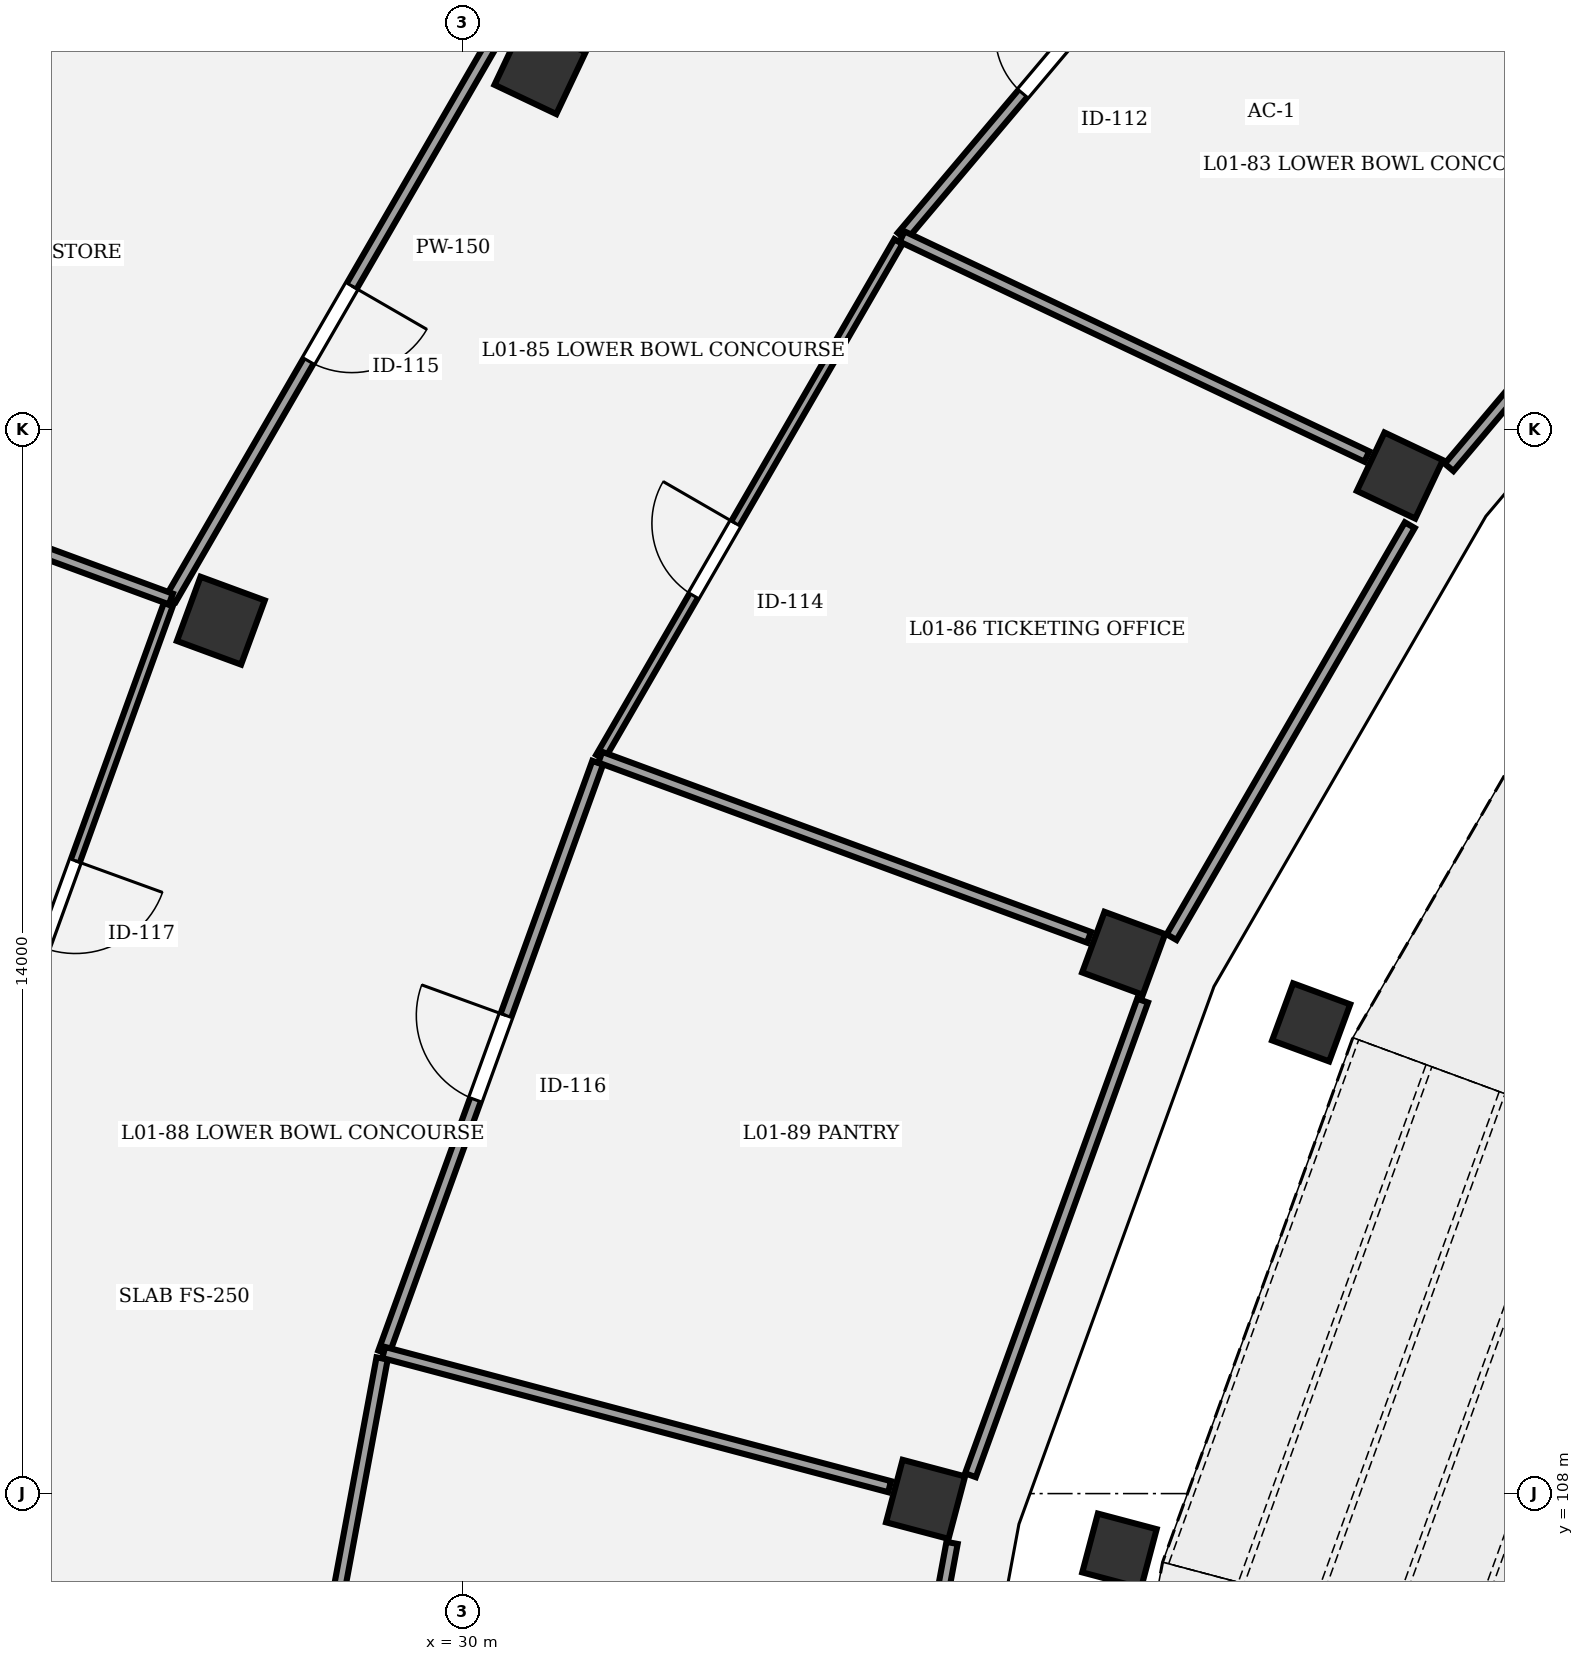
"""IFC4 building model, lengths in metres.
Left out: names, types, materials, properties, quantities, classifications, styles, units other than length and angle.
Written with IfcOpenShell. Run it as: python <this file> out.ifc"""

import sys

from ifc_helpers import new_model, si_unit, direction, frame, frame_2d, origin, origin_2d, place, context, subcontext, project, spatial, rectangle, extrude, element, fill, save


model = new_model("IFC4")
c1 = context("Model", 3, precision=1e-05, world=origin(), true_north=direction((0.0, 1.0)))
c2 = subcontext(c1, "Body", "Model", "MODEL_VIEW")
j1 = project(units=[si_unit("LENGTHUNIT", "METRE"), si_unit("PLANEANGLEUNIT", "RADIAN")], contexts=[c1])
p1 = place(None, origin())
s1 = spatial("IfcSite", under=j1, at=p1, CompositionType="ELEMENT")
p2 = place(p1, origin())
s2 = spatial("IfcBuilding", under=s1, at=p2, CompositionType="ELEMENT")
p3 = place(p2, frame((0.0, 0.0, 5.4)))
s3 = spatial("IfcBuildingStorey", under=s2, at=p3, CompositionType="ELEMENT", Elevation=5.4)
p4 = place(p3, frame((42.337, 121.394, 0.0), z_axis=(0.0, 0.0, 1.0), x_axis=(-0.903858661687, 0.4278311813, 0.0)))
e1 = element("IfcColumn", 1, at=p4, inside=s3, PredefinedType="COLUMN", context=c2, shape_type="SweptSolid", body=[
    extrude(rectangle(XDim=0.85, YDim=0.85, at=origin_2d()), origin(), (0.0, 0.0, 1.0), 4.8),
])
p5 = place(p3, frame((31.024, 126.748, 0.0), z_axis=(0.0, 0.0, 1.0), x_axis=(-0.903858661687, 0.4278311813, 0.0)))
e2 = element("IfcColumn", 2, at=p5, inside=s3, PredefinedType="COLUMN", context=c2, shape_type="SweptSolid", body=[
    extrude(rectangle(XDim=0.9, YDim=0.9, at=origin_2d()), origin(), (0.0, 0.0, 1.0), 4.8),
])
p6 = place(p3, frame((41.17, 114.199, 0.0), z_axis=(0.0, 0.0, 1.0), x_axis=(-0.938372433776, 0.34562577382, 0.0)))
e3 = element("IfcColumn", 3, at=p6, inside=s3, PredefinedType="COLUMN", context=c2, shape_type="SweptSolid", body=[
    extrude(rectangle(XDim=0.8, YDim=0.8, at=origin_2d()), origin(), (0.0, 0.0, 1.0), 4.8),
])
p7 = place(p3, frame((38.703, 115.108, 0.0), z_axis=(0.0, 0.0, 1.0), x_axis=(-0.938372433776, 0.34562577382, 0.0)))
e4 = element("IfcColumn", 4, at=p7, inside=s3, PredefinedType="COLUMN", context=c2, shape_type="SweptSolid", body=[
    extrude(rectangle(XDim=0.85, YDim=0.85, at=origin_2d()), origin(), (0.0, 0.0, 1.0), 4.8),
])
p8 = place(p3, frame((26.824, 119.484, 0.0), z_axis=(0.0, 0.0, 1.0), x_axis=(-0.938372433776, 0.34562577382, 0.0)))
e5 = element("IfcColumn", 5, at=p8, inside=s3, PredefinedType="COLUMN", context=c2, shape_type="SweptSolid", body=[
    extrude(rectangle(XDim=0.9, YDim=0.9, at=origin_2d()), origin(), (0.0, 0.0, 1.0), 4.8),
])
p9 = place(p3, frame((38.648, 107.248, 0.0), z_axis=(0.0, 0.0, 1.0), x_axis=(-0.966600102017, 0.256289373133, 0.0)))
e6 = element("IfcColumn", 6, at=p9, inside=s3, PredefinedType="COLUMN", context=c2, shape_type="SweptSolid", body=[
    extrude(rectangle(XDim=0.8, YDim=0.8, at=origin_2d()), origin(), (0.0, 0.0, 1.0), 4.8),
])
p10 = place(p3, frame((36.097, 107.924, 0.0), z_axis=(0.0, 0.0, 1.0), x_axis=(-0.966600102017, 0.256289373133, 0.0)))
e7 = element("IfcColumn", 7, at=p10, inside=s3, PredefinedType="COLUMN", context=c2, shape_type="SweptSolid", body=[
    extrude(rectangle(XDim=0.85, YDim=0.85, at=origin_2d()), origin(), (0.0, 0.0, 1.0), 4.8),
])
p11 = place(p3, frame((35.788, 124.538, 0.0), z_axis=(0.0, 0.0, 1.0), x_axis=(0.645180817826, 0.764029915847, 0.0)))
e8 = element("IfcWall", 8, at=p11, inside=s3, PredefinedType="PARTITIONING", context=c2, shape_type="SweptSolid", body=[
    extrude(rectangle(XDim=7.779, YDim=0.15, at=frame_2d((3.89, 0.0))), origin(), (0.0, 0.0, 1.0), 3.55),
])
p12 = place(p11, frame((2.462, 0.0, 0.0)))
e9 = element("IfcOpeningElement", 9, at=p12, cuts=e8, PredefinedType="OPENING", context=c2, shape_type="SweptSolid", body=[
    extrude(rectangle(XDim=1.02, YDim=2.1, at=frame_2d((0.51, 1.05))), frame((0.0, 0.085, 0.0), z_axis=(0.0, -1.0, 0.0), x_axis=(1.0, 0.0, 0.0)), (0.0, 0.0, 1.0), 0.17),
])
p13 = place(p3, frame((31.817, 117.688, 0.0), z_axis=(0.0, 0.0, 1.0), x_axis=(0.500584301803, 0.865687794063, 0.0)))
e10 = element("IfcWall", 10, at=p13, inside=s3, PredefinedType="PARTITIONING", context=c2, shape_type="SweptSolid", body=[
    extrude(rectangle(XDim=7.837, YDim=0.125, at=frame_2d((3.918, 0.0))), origin(), (0.0, 0.0, 1.0), 3.55),
])
p14 = place(p13, frame((2.454, 0.0, 0.0)))
e11 = element("IfcOpeningElement", 11, at=p14, cuts=e10, PredefinedType="OPENING", context=c2, shape_type="SweptSolid", body=[
    extrude(rectangle(XDim=1.1, YDim=2.1, at=frame_2d((0.55, 1.05))), frame((0.0, 0.073, 0.0), z_axis=(0.0, -1.0, 0.0), x_axis=(1.0, 0.0, 0.0)), (0.0, 0.0, 1.0), 0.145),
])
p15 = place(p3, frame((30.359, 127.019, 0.0), z_axis=(0.0, 0.0, 1.0), x_axis=(-0.500559280672, -0.865702262059, 0.0)))
e12 = element("IfcWall", 12, at=p15, inside=s3, PredefinedType="PARTITIONING", context=c2, shape_type="SweptSolid", body=[
    extrude(rectangle(XDim=8.375, YDim=0.15, at=frame_2d((4.187, 0.0))), origin(), (0.0, 0.0, 1.0), 3.55),
])
p16 = place(p15, frame((3.617, 0.0, 0.0)))
e13 = element("IfcOpeningElement", 13, at=p16, cuts=e12, PredefinedType="OPENING", context=c2, shape_type="SweptSolid", body=[
    extrude(rectangle(XDim=1.14, YDim=2.1, at=frame_2d((0.57, 1.05))), frame((0.0, 0.085, 0.0), z_axis=(0.0, -1.0, 0.0), x_axis=(1.0, 0.0, 0.0)), (0.0, 0.0, 1.0), 0.17),
])
p17 = place(p3, frame((28.968, 109.856, 0.0), z_axis=(0.0, 0.0, 1.0), x_axis=(0.341044733968, 0.940047067669, 0.0)))
e14 = element("IfcWall", 14, at=p17, inside=s3, PredefinedType="PARTITIONING", context=c2, shape_type="SweptSolid", body=[
    extrude(rectangle(XDim=8.254, YDim=0.15, at=frame_2d((4.127, 0.0))), origin(), (0.0, 0.0, 1.0), 3.55),
])
p18 = place(p17, frame((3.537, 0.0, 0.0)))
e15 = element("IfcOpeningElement", 15, at=p18, cuts=e14, PredefinedType="OPENING", context=c2, shape_type="SweptSolid", body=[
    extrude(rectangle(XDim=1.18, YDim=2.1, at=frame_2d((0.59, 1.05))), frame((0.0, 0.085, 0.0), z_axis=(0.0, -1.0, 0.0), x_axis=(1.0, 0.0, 0.0)), (0.0, 0.0, 1.0), 0.17),
])
p19 = place(p3, frame((26.134, 119.696, 0.0), z_axis=(0.0, 0.0, 1.0), x_axis=(-0.341044550343, -0.940047134287, 0.0)))
e16 = element("IfcWall", 16, at=p19, inside=s3, PredefinedType="PARTITIONING", context=c2, shape_type="SweptSolid", body=[
    extrude(rectangle(XDim=8.392, YDim=0.125, at=frame_2d((4.196, 0.0))), origin(), (0.0, 0.0, 1.0), 3.55),
])
p20 = place(p19, frame((3.586, 0.0, 0.0)))
e17 = element("IfcOpeningElement", 17, at=p20, cuts=e16, PredefinedType="OPENING", context=c2, shape_type="SweptSolid", body=[
    extrude(rectangle(XDim=1.22, YDim=2.1, at=frame_2d((0.61, 1.05))), frame((0.0, 0.073, 0.0), z_axis=(0.0, -1.0, 0.0), x_axis=(1.0, 0.0, 0.0)), (0.0, 0.0, 1.0), 0.145),
])
p21 = place(p3, frame((27.251, 100.651, 0.0), z_axis=(0.0, 0.0, 1.0), x_axis=(0.182600545941, 0.983187184936, 0.0)))
e18 = element("IfcWall", 18, at=p21, inside=s3, PredefinedType="PARTITIONING", context=c2, shape_type="SweptSolid", body=[
    extrude(rectangle(XDim=9.284, YDim=0.15, at=frame_2d((4.642, 0.0))), origin(), (0.0, 0.0, 1.0), 3.55),
])
p22 = place(p21, frame((4.012, 0.0, 0.0)))
e19 = element("IfcOpeningElement", 19, at=p22, cuts=e18, PredefinedType="OPENING", context=c2, shape_type="SweptSolid", body=[
    extrude(rectangle(XDim=1.26, YDim=2.1, at=frame_2d((0.63, 1.05))), frame((0.0, 0.085, 0.0), z_axis=(0.0, -1.0, 0.0), x_axis=(1.0, 0.0, 0.0)), (0.0, 0.0, 1.0), 0.17),
])
p23 = place(p3, frame((46.99, 126.245, 0.0), z_axis=(0.0, 0.0, 1.0), x_axis=(-0.645148682175, -0.764057051462, 0.0)))
e20 = element("IfcWall", 20, at=p23, inside=s3, PredefinedType="PARTITIONING", context=c2, shape_type="SweptSolid", body=[
    extrude(rectangle(XDim=6.209, YDim=0.15, at=frame_2d((3.104, 0.0))), origin(), (0.0, 0.0, 1.0), 3.55),
])
p24 = place(p3, frame((41.903, 121.644, 0.0), z_axis=(0.0, 0.0, 1.0), x_axis=(-0.903861986309, 0.427824157458, 0.0)))
e21 = element("IfcWall", 21, at=p24, inside=s3, PredefinedType="PARTITIONING", context=c2, shape_type="SweptSolid", body=[
    extrude(rectangle(XDim=6.765, YDim=0.15, at=frame_2d((3.383, 0.0))), origin(), (0.0, 0.0, 1.0), 3.55),
])
p25 = place(p3, frame((42.468, 120.741, 0.0), z_axis=(0.0, 0.0, 1.0), x_axis=(-0.500550442763, -0.865707372182, 0.0)))
e22 = element("IfcWall", 22, at=p25, inside=s3, PredefinedType="PARTITIONING", context=c2, shape_type="SweptSolid", body=[
    extrude(rectangle(XDim=6.261, YDim=0.15, at=frame_2d((3.13, 0.0))), origin(), (0.0, 0.0, 1.0), 3.55),
])
p26 = place(p3, frame((38.248, 115.319, 0.0), z_axis=(0.0, 0.0, 1.0), x_axis=(-0.938349806846, 0.345687199637, 0.0)))
e23 = element("IfcWall", 23, at=p26, inside=s3, PredefinedType="PARTITIONING", context=c2, shape_type="SweptSolid", body=[
    extrude(rectangle(XDim=6.854, YDim=0.15, at=frame_2d((3.427, 0.0))), origin(), (0.0, 0.0, 1.0), 3.55),
])
p27 = place(p3, frame((26.167, 119.769, 0.0), z_axis=(0.0, 0.0, 1.0), x_axis=(-0.938352081903, 0.34568102405, 0.0)))
e24 = element("IfcWall", 24, at=p27, inside=s3, PredefinedType="PARTITIONING", context=c2, shape_type="SweptSolid", body=[
    extrude(rectangle(XDim=7.904, YDim=0.15, at=frame_2d((3.952, 0.0))), origin(), (0.0, 0.0, 1.0), 3.55),
])
p28 = place(p3, frame((38.953, 114.486, 0.0), z_axis=(0.0, 0.0, 1.0), x_axis=(-0.341016974103, -0.940057138356, 0.0)))
e25 = element("IfcWall", 25, at=p28, inside=s3, PredefinedType="PARTITIONING", context=c2, shape_type="SweptSolid", body=[
    extrude(rectangle(XDim=6.642, YDim=0.15, at=frame_2d((3.321, 0.0))), origin(), (0.0, 0.0, 1.0), 3.55),
])
p29 = place(p3, frame((35.624, 108.091, 0.0), z_axis=(0.0, 0.0, 1.0), x_axis=(-0.966590603806, 0.256325193131, 0.0)))
e26 = element("IfcWall", 26, at=p29, inside=s3, PredefinedType="PARTITIONING", context=c2, shape_type="SweptSolid", body=[
    extrude(rectangle(XDim=6.886, YDim=0.15, at=frame_2d((3.443, 0.0))), origin(), (0.0, 0.0, 1.0), 3.55),
])
p30 = place(p3, frame((36.445, 107.351, 0.0), z_axis=(0.0, 0.0, 1.0), x_axis=(-0.182619301082, -0.983183701488, 0.0)))
e27 = element("IfcWall", 27, at=p30, inside=s3, PredefinedType="PARTITIONING", context=c2, shape_type="SweptSolid", body=[
    extrude(rectangle(XDim=7.587, YDim=0.15, at=frame_2d((3.793, 0.0))), origin(), (0.0, 0.0, 1.0), 3.55),
])
p31 = place(p12, origin())
e28 = element("IfcDoor", 28, at=p31, inside=s3, OperationType="SINGLE_SWING_RIGHT", PredefinedType="DOOR", context=c2, shape_type="SweptSolid", body=[
    extrude(rectangle(XDim=1.02, YDim=2.1, at=frame_2d((0.51, 1.05))), frame((0.0, 0.025, 0.0), z_axis=(0.0, -1.0, 0.0), x_axis=(1.0, 0.0, 0.0)), (0.0, 0.0, 1.0), 0.05),
])
fill(e9, e28)
p32 = place(p14, origin())
e29 = element("IfcDoor", 29, at=p32, inside=s3, OperationType="SINGLE_SWING_RIGHT", PredefinedType="DOOR", context=c2, shape_type="SweptSolid", body=[
    extrude(rectangle(XDim=1.1, YDim=2.1, at=frame_2d((0.55, 1.05))), frame((0.0, 0.025, 0.0), z_axis=(0.0, -1.0, 0.0), x_axis=(1.0, 0.0, 0.0)), (0.0, 0.0, 1.0), 0.05),
])
fill(e11, e29)
p33 = place(p16, origin())
e30 = element("IfcDoor", 30, at=p33, inside=s3, OperationType="SINGLE_SWING_LEFT", PredefinedType="DOOR", context=c2, shape_type="SweptSolid", body=[
    extrude(rectangle(XDim=1.14, YDim=2.1, at=frame_2d((0.57, 1.05))), frame((0.0, 0.025, 0.0), z_axis=(0.0, -1.0, 0.0), x_axis=(1.0, 0.0, 0.0)), (0.0, 0.0, 1.0), 0.05),
])
fill(e13, e30)
p34 = place(p18, origin())
e31 = element("IfcDoor", 31, at=p34, inside=s3, OperationType="SINGLE_SWING_RIGHT", PredefinedType="DOOR", context=c2, shape_type="SweptSolid", body=[
    extrude(rectangle(XDim=1.18, YDim=2.1, at=frame_2d((0.59, 1.05))), frame((0.0, 0.025, 0.0), z_axis=(0.0, -1.0, 0.0), x_axis=(1.0, 0.0, 0.0)), (0.0, 0.0, 1.0), 0.05),
])
fill(e15, e31)
p35 = place(p20, origin())
e32 = element("IfcDoor", 32, at=p35, inside=s3, OperationType="SINGLE_SWING_LEFT", PredefinedType="DOOR", context=c2, shape_type="SweptSolid", body=[
    extrude(rectangle(XDim=1.22, YDim=2.1, at=frame_2d((0.61, 1.05))), frame((0.0, 0.025, 0.0), z_axis=(0.0, -1.0, 0.0), x_axis=(1.0, 0.0, 0.0)), (0.0, 0.0, 1.0), 0.05),
])
fill(e17, e32)
save(model, sys.argv[1])
